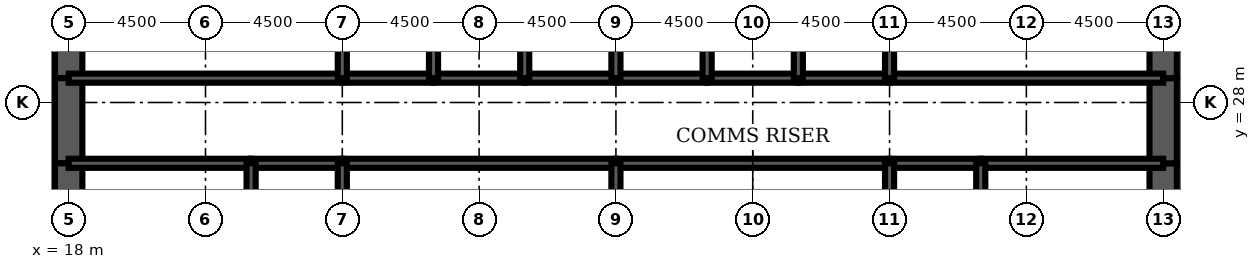
"""IFC4 building model, lengths in metres.
Left out: names, types, materials, properties, quantities, classifications, styles, units other than length and angle.
Written with IfcOpenShell. Run it as: python <this file> out.ifc"""

import sys

from ifc_helpers import new_model, si_unit, direction, frame, frame_2d, origin, place, context, subcontext, project, spatial, rectangle, extrude, element, fill, save


model = new_model("IFC4")
c1 = context("Model", 3, precision=1e-05, world=origin(), true_north=direction((0.0, 1.0)))
c2 = subcontext(c1, "Body", "Model", "MODEL_VIEW")
j1 = project(units=[si_unit("LENGTHUNIT", "METRE"), si_unit("PLANEANGLEUNIT", "RADIAN")], contexts=[c1])
p1 = place(None, origin())
s1 = spatial("IfcSite", under=j1, at=p1, CompositionType="ELEMENT")
p2 = place(p1, origin())
s2 = spatial("IfcBuilding", under=s1, at=p2, CompositionType="ELEMENT")
p3 = place(p2, frame((0.0, 0.0, 129.9)))
s3 = spatial("IfcBuildingStorey", under=s2, at=p3, CompositionType="ELEMENT", Elevation=129.9)
p4 = place(p3, frame((18.0, 32.0, 0.0), z_axis=(0.0, 0.0, 1.0), x_axis=(0.0, -1.0, 0.0)))
e1 = element("IfcWall", 1, at=p4, inside=s3, PredefinedType="SHEAR", context=c2, shape_type="SweptSolid", body=[
    extrude(rectangle(XDim=3.2, YDim=0.9, at=frame_2d((1.6, 0.0))), origin(), (0.0, 0.0, 1.0), 4.2),
])
p5 = place(p3, frame((18.0, 28.8, 0.0), z_axis=(0.0, 0.0, 1.0), x_axis=(0.0, -1.0, 0.0)))
e2 = element("IfcWall", 2, at=p5, inside=s3, PredefinedType="SHEAR", context=c2, shape_type="SweptSolid", body=[
    extrude(rectangle(XDim=2.8, YDim=0.9, at=frame_2d((1.4, 0.0))), origin(), (0.0, 0.0, 1.0), 4.2),
])
p6 = place(p5, frame((0.4, 0.0, 0.0)))
e3 = element("IfcOpeningElement", 3, at=p6, cuts=e2, PredefinedType="OPENING", context=c2, shape_type="SweptSolid", body=[
    extrude(rectangle(XDim=1.8, YDim=2.1, at=frame_2d((0.9, 1.05))), frame((0.0, 0.46, 0.0), z_axis=(0.0, -1.0, 0.0), x_axis=(1.0, 0.0, 0.0)), (0.0, 0.0, 1.0), 0.92),
])
for number, where, z_axis, x_axis in (
    (4, (18.0, 26.0, 0.0), (0.0, 0.0, 1.0), (0.0, -1.0, 0.0)),
    (5, (54.0, 22.0, 0.0), (0.0, 0.0, 1.0), (0.0, 1.0, 0.0)),
):
    element("IfcWall", number, at=place(p3, frame(where, z_axis=z_axis, x_axis=x_axis)), inside=s3, PredefinedType="SHEAR", context=c2, shape_type="SweptSolid", body=[
        extrude(rectangle(XDim=4.0, YDim=0.9, at=frame_2d((2.0, 0.0))), origin(), (0.0, 0.0, 1.0), 4.2),
    ])
p7 = place(p3, frame((54.0, 26.0, 0.0), z_axis=(0.0, 0.0, 1.0), x_axis=(0.0, 1.0, 0.0)))
e6 = element("IfcWall", 6, at=p7, inside=s3, PredefinedType="SHEAR", context=c2, shape_type="SweptSolid", body=[
    extrude(rectangle(XDim=2.8, YDim=0.9, at=frame_2d((1.4, 0.0))), origin(), (0.0, 0.0, 1.0), 4.2),
])
p8 = place(p7, frame((0.6, 0.0, 0.0)))
e7 = element("IfcOpeningElement", 7, at=p8, cuts=e6, PredefinedType="OPENING", context=c2, shape_type="SweptSolid", body=[
    extrude(rectangle(XDim=1.8, YDim=2.1, at=frame_2d((0.9, 1.05))), frame((0.0, 0.46, 0.0), z_axis=(0.0, -1.0, 0.0), x_axis=(1.0, 0.0, 0.0)), (0.0, 0.0, 1.0), 0.92),
])
p9 = place(p3, frame((54.0, 28.8, 0.0), z_axis=(0.0, 0.0, 1.0), x_axis=(0.0, 1.0, 0.0)))
e8 = element("IfcWall", 8, at=p9, inside=s3, PredefinedType="SHEAR", context=c2, shape_type="SweptSolid", body=[
    extrude(rectangle(XDim=3.2, YDim=0.9, at=frame_2d((1.6, 0.0))), origin(), (0.0, 0.0, 1.0), 4.2),
])
p10 = place(p3, frame((18.0, 28.8, 0.0), z_axis=(0.0, 0.0, 1.0), x_axis=(1.0, 0.0, 0.0)))
e9 = element("IfcWall", 9, at=p10, inside=s3, PredefinedType="SOLIDWALL", context=c2, shape_type="SweptSolid", body=[
    extrude(rectangle(XDim=9.0, YDim=0.3, at=frame_2d((4.5, 0.0))), origin(), (0.0, 0.0, 1.0), 4.2),
])
p11 = place(p10, frame((0.65, 0.0, 0.0)))
e10 = element("IfcOpeningElement", 10, at=p11, cuts=e9, PredefinedType="OPENING", context=c2, shape_type="SweptSolid", body=[
    extrude(rectangle(XDim=1.0, YDim=2.1, at=frame_2d((0.5, 1.05))), frame((0.0, 0.16, 0.0), z_axis=(0.0, -1.0, 0.0), x_axis=(1.0, 0.0, 0.0)), (0.0, 0.0, 1.0), 0.32),
])
p12 = place(p3, frame((27.0, 28.8, 0.0), z_axis=(0.0, 0.0, 1.0), x_axis=(1.0, 0.0, 0.0)))
e11 = element("IfcWall", 11, at=p12, inside=s3, PredefinedType="SOLIDWALL", context=c2, shape_type="SweptSolid", body=[
    extrude(rectangle(XDim=3.0, YDim=0.3, at=frame_2d((1.5, 0.0))), origin(), (0.0, 0.0, 1.0), 4.2),
])
p13 = place(p12, frame((0.95, 0.0, 0.0)))
e12 = element("IfcOpeningElement", 12, at=p13, cuts=e11, PredefinedType="OPENING", context=c2, shape_type="SweptSolid", body=[
    extrude(rectangle(XDim=1.1, YDim=2.2, at=frame_2d((0.55, 1.1))), frame((0.0, 0.16, 0.0), z_axis=(0.0, -1.0, 0.0), x_axis=(1.0, 0.0, 0.0)), (0.0, 0.0, 1.0), 0.32),
])
p14 = place(p3, frame((30.0, 28.8, 0.0), z_axis=(0.0, 0.0, 1.0), x_axis=(1.0, 0.0, 0.0)))
e13 = element("IfcWall", 13, at=p14, inside=s3, PredefinedType="SOLIDWALL", context=c2, shape_type="SweptSolid", body=[
    extrude(rectangle(XDim=3.0, YDim=0.3, at=frame_2d((1.5, 0.0))), origin(), (0.0, 0.0, 1.0), 4.2),
])
p15 = place(p14, frame((0.95, 0.0, 0.0)))
e14 = element("IfcOpeningElement", 14, at=p15, cuts=e13, PredefinedType="OPENING", context=c2, shape_type="SweptSolid", body=[
    extrude(rectangle(XDim=1.1, YDim=2.2, at=frame_2d((0.55, 1.1))), frame((0.0, 0.16, 0.0), z_axis=(0.0, -1.0, 0.0), x_axis=(1.0, 0.0, 0.0)), (0.0, 0.0, 1.0), 0.32),
])
p16 = place(p3, frame((33.0, 28.8, 0.0), z_axis=(0.0, 0.0, 1.0), x_axis=(1.0, 0.0, 0.0)))
e15 = element("IfcWall", 15, at=p16, inside=s3, PredefinedType="SOLIDWALL", context=c2, shape_type="SweptSolid", body=[
    extrude(rectangle(XDim=3.0, YDim=0.3, at=frame_2d((1.5, 0.0))), origin(), (0.0, 0.0, 1.0), 4.2),
])
p17 = place(p16, frame((0.95, 0.0, 0.0)))
e16 = element("IfcOpeningElement", 16, at=p17, cuts=e15, PredefinedType="OPENING", context=c2, shape_type="SweptSolid", body=[
    extrude(rectangle(XDim=1.1, YDim=2.2, at=frame_2d((0.55, 1.1))), frame((0.0, 0.16, 0.0), z_axis=(0.0, -1.0, 0.0), x_axis=(1.0, 0.0, 0.0)), (0.0, 0.0, 1.0), 0.32),
])
for number, where, z_axis, x_axis in (
    (17, (36.0, 28.8, 0.0), (0.0, 0.0, 1.0), (1.0, 0.0, 0.0)),
    (18, (39.0, 28.8, 0.0), (0.0, 0.0, 1.0), (1.0, 0.0, 0.0)),
):
    element("IfcWall", number, at=place(p3, frame(where, z_axis=z_axis, x_axis=x_axis)), inside=s3, PredefinedType="SOLIDWALL", context=c2, shape_type="SweptSolid", body=[
        extrude(rectangle(XDim=3.0, YDim=0.3, at=frame_2d((1.5, 0.0))), origin(), (0.0, 0.0, 1.0), 4.2),
    ])
p18 = place(p3, frame((42.0, 28.8, 0.0), z_axis=(0.0, 0.0, 1.0), x_axis=(1.0, 0.0, 0.0)))
e19 = element("IfcWall", 19, at=p18, inside=s3, PredefinedType="SOLIDWALL", context=c2, shape_type="SweptSolid", body=[
    extrude(rectangle(XDim=3.0, YDim=0.3, at=frame_2d((1.5, 0.0))), origin(), (0.0, 0.0, 1.0), 4.2),
])
p19 = place(p18, frame((0.95, 0.0, 0.0)))
e20 = element("IfcOpeningElement", 20, at=p19, cuts=e19, PredefinedType="OPENING", context=c2, shape_type="SweptSolid", body=[
    extrude(rectangle(XDim=1.1, YDim=2.2, at=frame_2d((0.55, 1.1))), frame((0.0, 0.16, 0.0), z_axis=(0.0, -1.0, 0.0), x_axis=(1.0, 0.0, 0.0)), (0.0, 0.0, 1.0), 0.32),
])
p20 = place(p3, frame((45.0, 28.8, 0.0), z_axis=(0.0, 0.0, 1.0), x_axis=(1.0, 0.0, 0.0)))
e21 = element("IfcWall", 21, at=p20, inside=s3, PredefinedType="SOLIDWALL", context=c2, shape_type="SweptSolid", body=[
    extrude(rectangle(XDim=9.0, YDim=0.3, at=frame_2d((4.5, 0.0))), origin(), (0.0, 0.0, 1.0), 4.2),
])
p21 = place(p20, frame((7.35, 0.0, 0.0)))
e22 = element("IfcOpeningElement", 22, at=p21, cuts=e21, PredefinedType="OPENING", context=c2, shape_type="SweptSolid", body=[
    extrude(rectangle(XDim=1.0, YDim=2.1, at=frame_2d((0.5, 1.05))), frame((0.0, 0.16, 0.0), z_axis=(0.0, -1.0, 0.0), x_axis=(1.0, 0.0, 0.0)), (0.0, 0.0, 1.0), 0.32),
])
p22 = place(p3, frame((18.0, 26.0, 0.0), z_axis=(0.0, 0.0, 1.0), x_axis=(1.0, 0.0, 0.0)))
e23 = element("IfcWall", 23, at=p22, inside=s3, PredefinedType="SOLIDWALL", context=c2, shape_type="SweptSolid", body=[
    extrude(rectangle(XDim=6.0, YDim=0.3, at=frame_2d((3.0, 0.0))), origin(), (0.0, 0.0, 1.0), 4.2),
])
p23 = place(p3, frame((24.0, 26.0, 0.0), z_axis=(0.0, 0.0, 1.0), x_axis=(1.0, 0.0, 0.0)))
e24 = element("IfcWall", 24, at=p23, inside=s3, PredefinedType="SOLIDWALL", context=c2, shape_type="SweptSolid", body=[
    extrude(rectangle(XDim=3.0, YDim=0.3, at=frame_2d((1.5, 0.0))), origin(), (0.0, 0.0, 1.0), 4.2),
])
for number, where, z_axis, x_axis in (
    (25, (27.0, 26.0, 0.0), (0.0, 0.0, 1.0), (1.0, 0.0, 0.0)),
    (26, (36.0, 26.0, 0.0), (0.0, 0.0, 1.0), (1.0, 0.0, 0.0)),
):
    element("IfcWall", number, at=place(p3, frame(where, z_axis=z_axis, x_axis=x_axis)), inside=s3, PredefinedType="SOLIDWALL", context=c2, shape_type="SweptSolid", body=[
        extrude(rectangle(XDim=9.0, YDim=0.3, at=frame_2d((4.5, 0.0))), origin(), (0.0, 0.0, 1.0), 4.2),
    ])
p24 = place(p3, frame((45.0, 26.0, 0.0), z_axis=(0.0, 0.0, 1.0), x_axis=(1.0, 0.0, 0.0)))
e27 = element("IfcWall", 27, at=p24, inside=s3, PredefinedType="SOLIDWALL", context=c2, shape_type="SweptSolid", body=[
    extrude(rectangle(XDim=3.0, YDim=0.3, at=frame_2d((1.5, 0.0))), origin(), (0.0, 0.0, 1.0), 4.2),
])
p25 = place(p3, frame((48.0, 26.0, 0.0), z_axis=(0.0, 0.0, 1.0), x_axis=(1.0, 0.0, 0.0)))
e28 = element("IfcWall", 28, at=p25, inside=s3, PredefinedType="SOLIDWALL", context=c2, shape_type="SweptSolid", body=[
    extrude(rectangle(XDim=6.0, YDim=0.3, at=frame_2d((3.0, 0.0))), origin(), (0.0, 0.0, 1.0), 4.2),
])
for number, where, z_axis, x_axis in (
    (29, (27.0, 28.8, 0.0), (0.0, 0.0, 1.0), (0.0, 1.0, 0.0)),
    (30, (30.0, 28.8, 0.0), (0.0, 0.0, 1.0), (0.0, 1.0, 0.0)),
    (31, (33.0, 28.8, 0.0), (0.0, 0.0, 1.0), (0.0, 1.0, 0.0)),
    (32, (36.0, 28.8, 0.0), (0.0, 0.0, 1.0), (0.0, 1.0, 0.0)),
    (33, (39.0, 28.8, 0.0), (0.0, 0.0, 1.0), (0.0, 1.0, 0.0)),
    (34, (42.0, 28.8, 0.0), (0.0, 0.0, 1.0), (0.0, 1.0, 0.0)),
    (35, (45.0, 28.8, 0.0), (0.0, 0.0, 1.0), (0.0, 1.0, 0.0)),
):
    element("IfcWall", number, at=place(p3, frame(where, z_axis=z_axis, x_axis=x_axis)), inside=s3, PredefinedType="SOLIDWALL", context=c2, shape_type="SweptSolid", body=[
        extrude(rectangle(XDim=3.2, YDim=0.3, at=frame_2d((1.6, 0.0))), origin(), (0.0, 0.0, 1.0), 4.2),
    ])
for number, where, z_axis, x_axis in (
    (36, (24.0, 22.0, 0.0), (0.0, 0.0, 1.0), (0.0, 1.0, 0.0)),
    (37, (27.0, 22.0, 0.0), (0.0, 0.0, 1.0), (0.0, 1.0, 0.0)),
    (38, (36.0, 22.0, 0.0), (0.0, 0.0, 1.0), (0.0, 1.0, 0.0)),
    (39, (45.0, 22.0, 0.0), (0.0, 0.0, 1.0), (0.0, 1.0, 0.0)),
    (40, (48.0, 22.0, 0.0), (0.0, 0.0, 1.0), (0.0, 1.0, 0.0)),
):
    element("IfcWall", number, at=place(p3, frame(where, z_axis=z_axis, x_axis=x_axis)), inside=s3, PredefinedType="SOLIDWALL", context=c2, shape_type="SweptSolid", body=[
        extrude(rectangle(XDim=4.0, YDim=0.3, at=frame_2d((2.0, 0.0))), origin(), (0.0, 0.0, 1.0), 4.2),
    ])
p26 = place(p3, frame((38.0, 22.15, 0.0), z_axis=(0.0, 0.0, 1.0), x_axis=(0.0, 1.0, 0.0)))
e41 = element("IfcWall", 41, at=p26, inside=s3, PredefinedType="PARTITIONING", context=c2, shape_type="SweptSolid", body=[
    extrude(rectangle(XDim=3.7, YDim=0.15, at=frame_2d((1.85, 0.0))), origin(), (0.0, 0.0, 1.0), 3.0),
])
p27 = place(p26, frame((2.2, 0.0, 0.0)))
e42 = element("IfcOpeningElement", 42, at=p27, cuts=e41, PredefinedType="OPENING", context=c2, shape_type="SweptSolid", body=[
    extrude(rectangle(XDim=1.0, YDim=2.1, at=frame_2d((0.5, 1.05))), frame((0.0, 0.085, 0.0), z_axis=(0.0, -1.0, 0.0), x_axis=(1.0, 0.0, 0.0)), (0.0, 0.0, 1.0), 0.17),
])
p28 = place(p3, frame((51.675, 22.15, 0.0), z_axis=(0.0, 0.0, 1.0), x_axis=(0.0, 1.0, 0.0)))
e43 = element("IfcWall", 43, at=p28, inside=s3, PredefinedType="PARTITIONING", context=c2, shape_type="SweptSolid", body=[
    extrude(rectangle(XDim=3.7, YDim=0.15, at=frame_2d((1.85, 0.0))), origin(), (0.0, 0.0, 1.0), 3.0),
])
p29 = place(p27, origin())
e44 = element("IfcDoor", 44, at=p29, inside=s3, OperationType="SINGLE_SWING_RIGHT", PredefinedType="DOOR", context=c2, shape_type="SweptSolid", body=[
    extrude(rectangle(XDim=1.0, YDim=2.1, at=frame_2d((0.5, 1.05))), frame((0.0, 0.025, 0.0), z_axis=(0.0, -1.0, 0.0), x_axis=(1.0, 0.0, 0.0)), (0.0, 0.0, 1.0), 0.05),
])
fill(e42, e44)
p30 = place(p19, origin())
e45 = element("IfcDoor", 45, at=p30, inside=s3, OperationType="DOUBLE_DOOR_SLIDING", PredefinedType="USERDEFINED", context=c2, shape_type="SweptSolid", body=[
    extrude(rectangle(XDim=1.1, YDim=2.2, at=frame_2d((0.55, 1.1))), frame((0.0, 0.025, 0.0), z_axis=(0.0, -1.0, 0.0), x_axis=(1.0, 0.0, 0.0)), (0.0, 0.0, 1.0), 0.05),
])
fill(e20, e45)
p31 = place(p13, origin())
e46 = element("IfcDoor", 46, at=p31, inside=s3, OperationType="DOUBLE_DOOR_SLIDING", PredefinedType="USERDEFINED", context=c2, shape_type="SweptSolid", body=[
    extrude(rectangle(XDim=1.1, YDim=2.2, at=frame_2d((0.55, 1.1))), frame((0.0, 0.025, 0.0), z_axis=(0.0, -1.0, 0.0), x_axis=(1.0, 0.0, 0.0)), (0.0, 0.0, 1.0), 0.05),
])
fill(e12, e46)
p32 = place(p15, origin())
e47 = element("IfcDoor", 47, at=p32, inside=s3, OperationType="DOUBLE_DOOR_SLIDING", PredefinedType="USERDEFINED", context=c2, shape_type="SweptSolid", body=[
    extrude(rectangle(XDim=1.1, YDim=2.2, at=frame_2d((0.55, 1.1))), frame((0.0, 0.025, 0.0), z_axis=(0.0, -1.0, 0.0), x_axis=(1.0, 0.0, 0.0)), (0.0, 0.0, 1.0), 0.05),
])
fill(e14, e47)
p33 = place(p17, origin())
e48 = element("IfcDoor", 48, at=p33, inside=s3, OperationType="DOUBLE_DOOR_SLIDING", PredefinedType="USERDEFINED", context=c2, shape_type="SweptSolid", body=[
    extrude(rectangle(XDim=1.1, YDim=2.2, at=frame_2d((0.55, 1.1))), frame((0.0, 0.025, 0.0), z_axis=(0.0, -1.0, 0.0), x_axis=(1.0, 0.0, 0.0)), (0.0, 0.0, 1.0), 0.05),
])
fill(e16, e48)
p34 = place(p11, origin())
e49 = element("IfcDoor", 49, at=p34, inside=s3, OperationType="SINGLE_SWING_LEFT", PredefinedType="DOOR", context=c2, shape_type="SweptSolid", body=[
    extrude(rectangle(XDim=1.0, YDim=2.1, at=frame_2d((0.5, 1.05))), frame((0.0, 0.025, 0.0), z_axis=(0.0, -1.0, 0.0), x_axis=(1.0, 0.0, 0.0)), (0.0, 0.0, 1.0), 0.05),
])
fill(e10, e49)
p35 = place(p21, origin())
e50 = element("IfcDoor", 50, at=p35, inside=s3, OperationType="SINGLE_SWING_RIGHT", PredefinedType="DOOR", context=c2, shape_type="SweptSolid", body=[
    extrude(rectangle(XDim=1.0, YDim=2.1, at=frame_2d((0.5, 1.05))), frame((0.0, 0.025, 0.0), z_axis=(0.0, -1.0, 0.0), x_axis=(1.0, 0.0, 0.0)), (0.0, 0.0, 1.0), 0.05),
])
fill(e22, e50)
p36 = place(p6, origin())
e51 = element("IfcDoor", 51, at=p36, inside=s3, OperationType="SINGLE_SWING_LEFT", PredefinedType="DOOR", context=c2, shape_type="SweptSolid", body=[
    extrude(rectangle(XDim=1.8, YDim=2.1, at=frame_2d((0.9, 1.05))), frame((0.0, 0.45, 0.0), z_axis=(0.0, -1.0, 0.0), x_axis=(1.0, 0.0, 0.0)), (0.0, 0.0, 1.0), 0.899),
])
fill(e3, e51)
p37 = place(p8, origin())
e52 = element("IfcDoor", 52, at=p37, inside=s3, OperationType="SINGLE_SWING_LEFT", PredefinedType="DOOR", context=c2, shape_type="SweptSolid", body=[
    extrude(rectangle(XDim=1.8, YDim=2.1, at=frame_2d((0.9, 1.05))), frame((0.0, 0.45, 0.0), z_axis=(0.0, -1.0, 0.0), x_axis=(1.0, 0.0, 0.0)), (0.0, 0.0, 1.0), 0.899),
])
fill(e7, e52)
save(model, sys.argv[1])
